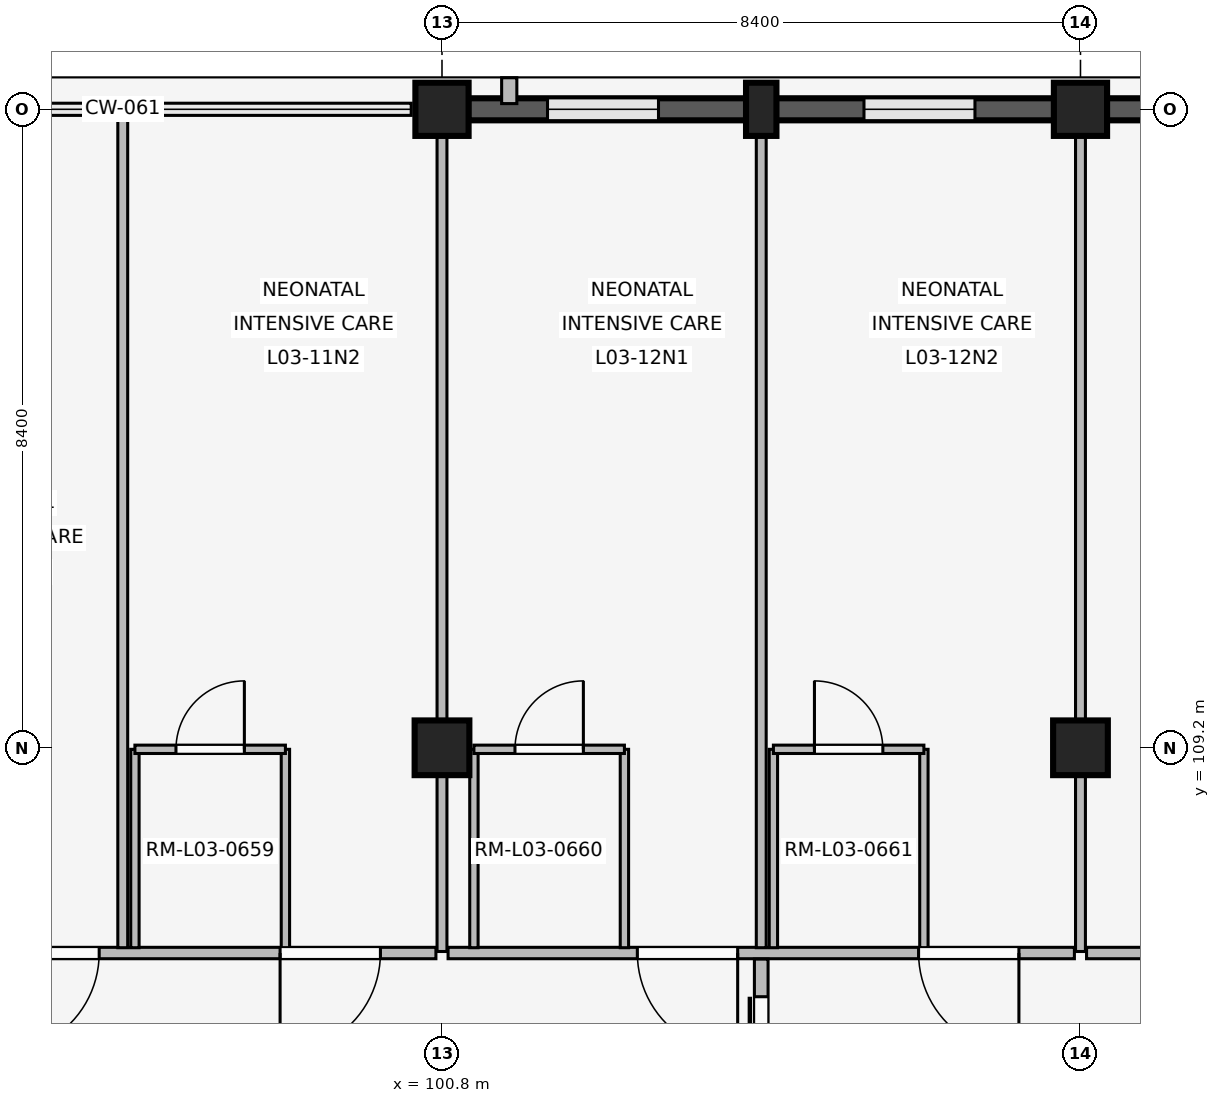
"""IFC4 building model, lengths in metres.
Left out: names, types, materials, properties, quantities, classifications, styles, units other than length and angle.
Written with IfcOpenShell. Run it as: python <this file> out.ifc"""

import sys

from ifc_helpers import new_model, si_unit, direction, frame, frame_2d, origin, origin_2d, place, context, subcontext, project, spatial, rectangle, extrude, element, fill, save


model = new_model("IFC4")
c1 = context("Model", 3, precision=1e-05, world=origin(), true_north=direction((0.0, 1.0)))
c2 = subcontext(c1, "Body", "Model", "MODEL_VIEW")
j1 = project(units=[si_unit("LENGTHUNIT", "METRE"), si_unit("PLANEANGLEUNIT", "RADIAN")], contexts=[c1])
p1 = place(None, origin())
s1 = spatial("IfcSite", under=j1, at=p1, CompositionType="ELEMENT")
p2 = place(p1, origin())
s2 = spatial("IfcBuilding", under=s1, at=p2, CompositionType="ELEMENT")
p3 = place(p2, frame((0.0, 0.0, 12.9)))
s3 = spatial("IfcBuildingStorey", under=s2, at=p3, CompositionType="ELEMENT", Elevation=12.9)
p4 = place(p3, frame((100.8, 109.2, 0.0), z_axis=(0.0, 0.0, 1.0), x_axis=(1.0, 0.0, 0.0)))
e1 = element("IfcColumn", 1, at=p4, inside=s3, PredefinedType="COLUMN", context=c2, shape_type="SweptSolid", body=[
    extrude(rectangle(XDim=0.72, YDim=0.72, at=origin_2d()), origin(), (0.0, 0.0, 1.0), 3.3),
])
p5 = place(p3, frame((100.8, 117.6, 0.0), z_axis=(0.0, 0.0, 1.0), x_axis=(1.0, 0.0, 0.0)))
e2 = element("IfcColumn", 2, at=p5, inside=s3, PredefinedType="COLUMN", context=c2, shape_type="SweptSolid", body=[
    extrude(rectangle(XDim=0.7, YDim=0.7, at=origin_2d()), origin(), (0.0, 0.0, 1.0), 3.3),
])
p6 = place(p3, frame((109.2, 109.2, 0.0), z_axis=(0.0, 0.0, 1.0), x_axis=(1.0, 0.0, 0.0)))
e3 = element("IfcColumn", 3, at=p6, inside=s3, PredefinedType="COLUMN", context=c2, shape_type="SweptSolid", body=[
    extrude(rectangle(XDim=0.72, YDim=0.72, at=origin_2d()), origin(), (0.0, 0.0, 1.0), 3.3),
])
p7 = place(p3, frame((109.2, 117.6, 0.0), z_axis=(0.0, 0.0, 1.0), x_axis=(1.0, 0.0, 0.0)))
e4 = element("IfcColumn", 4, at=p7, inside=s3, PredefinedType="COLUMN", context=c2, shape_type="SweptSolid", body=[
    extrude(rectangle(XDim=0.7, YDim=0.7, at=origin_2d()), origin(), (0.0, 0.0, 1.0), 3.3),
])
p8 = place(p3, frame((105.0, 117.6, 0.0), z_axis=(0.0, 0.0, 1.0), x_axis=(1.0, 0.0, 0.0)))
e5 = element("IfcColumn", 5, at=p8, inside=s3, PredefinedType="PILASTER", context=c2, shape_type="SweptSolid", body=[
    extrude(rectangle(XDim=0.4, YDim=0.7, at=origin_2d()), origin(), (0.0, 0.0, 1.0), 3.3),
])
p9 = place(p3, frame((101.145, 117.6, 0.0), z_axis=(0.0, 0.0, 1.0), x_axis=(1.0, 0.0, 0.0)))
e6 = element("IfcWall", 6, at=p9, inside=s3, PredefinedType="SOLIDWALL", context=c2, shape_type="SweptSolid", body=[
    extrude(rectangle(XDim=7.71, YDim=0.29, at=frame_2d((3.855, 0.0))), origin(), (0.0, 0.0, 1.0), 2.44),
])
p10 = place(p9, frame((1.043, 0.0, 0.85)))
e7 = element("IfcOpeningElement", 7, at=p10, cuts=e6, PredefinedType="OPENING", context=c2, shape_type="SweptSolid", body=[
    extrude(rectangle(XDim=1.46, YDim=0.85, at=frame_2d((0.73, 0.425))), frame((0.0, 0.155, 0.0), z_axis=(0.0, -1.0, 0.0), x_axis=(1.0, 0.0, 0.0)), (0.0, 0.0, 1.0), 0.31),
])
p11 = place(p9, frame((5.207, 0.0, 0.85)))
e8 = element("IfcOpeningElement", 8, at=p11, cuts=e6, PredefinedType="OPENING", context=c2, shape_type="SweptSolid", body=[
    extrude(rectangle(XDim=1.46, YDim=0.85, at=frame_2d((0.73, 0.425))), frame((0.0, 0.155, 0.0), z_axis=(0.0, -1.0, 0.0), x_axis=(1.0, 0.0, 0.0)), (0.0, 0.0, 1.0), 0.31),
])
p12 = place(p3, frame((101.685, 117.675, 0.0), z_axis=(0.0, 0.0, 1.0), x_axis=(0.0, 1.0, 0.0)))
e9 = element("IfcWall", 9, at=p12, inside=s3, PredefinedType="ELEMENTEDWALL", context=c2, shape_type="SweptSolid", body=[
    extrude(rectangle(XDim=0.34, YDim=0.2, at=frame_2d((0.17, 0.0))), origin(), (0.0, 0.0, 1.0), 2.42),
])
p13 = place(p3, frame((109.545, 117.6, 0.0), z_axis=(0.0, 0.0, 1.0), x_axis=(1.0, 0.0, 0.0)))
e10 = element("IfcWall", 10, at=p13, inside=s3, PredefinedType="SOLIDWALL", context=c2, shape_type="SweptSolid", body=[
    extrude(rectangle(XDim=7.71, YDim=0.29, at=frame_2d((3.855, 0.0))), origin(), (0.0, 0.0, 1.0), 2.44),
])
p14 = place(p13, frame((0.963, 0.0, 0.85)))
e11 = element("IfcOpeningElement", 11, at=p14, cuts=e10, PredefinedType="OPENING", context=c2, shape_type="SweptSolid", body=[
    extrude(rectangle(XDim=1.62, YDim=0.95, at=frame_2d((0.81, 0.475))), frame((0.0, 0.155, 0.0), z_axis=(0.0, -1.0, 0.0), x_axis=(1.0, 0.0, 0.0)), (0.0, 0.0, 1.0), 0.31),
])
p15 = place(p13, frame((5.127, 0.0, 0.85)))
e12 = element("IfcOpeningElement", 12, at=p15, cuts=e10, PredefinedType="OPENING", context=c2, shape_type="SweptSolid", body=[
    extrude(rectangle(XDim=1.62, YDim=0.95, at=frame_2d((0.81, 0.475))), frame((0.0, 0.155, 0.0), z_axis=(0.0, -1.0, 0.0), x_axis=(1.0, 0.0, 0.0)), (0.0, 0.0, 1.0), 0.31),
])
p16 = place(p3, frame((100.72, 106.5, 0.0), z_axis=(0.0, 0.0, 1.0), x_axis=(-1.0, 0.0, 0.0)))
e13 = element("IfcWall", 13, at=p16, inside=s3, PredefinedType="PARTITIONING", context=c2, shape_type="SweptSolid", body=[
    extrude(rectangle(XDim=7.96, YDim=0.15, at=frame_2d((3.98, 0.0))), origin(), (0.0, 0.0, 1.0), 2.42),
])
p17 = place(p16, frame((0.73, 0.0, 0.0)))
e14 = element("IfcOpeningElement", 14, at=p17, cuts=e13, PredefinedType="OPENING", context=c2, shape_type="SweptSolid", body=[
    extrude(rectangle(XDim=1.32, YDim=2.25, at=frame_2d((0.66, 1.125))), frame((0.0, 0.085, 0.0), z_axis=(0.0, -1.0, 0.0), x_axis=(1.0, 0.0, 0.0)), (0.0, 0.0, 1.0), 0.17),
])
p18 = place(p16, frame((4.43, 0.0, 0.0)))
e15 = element("IfcOpeningElement", 15, at=p18, cuts=e13, PredefinedType="OPENING", context=c2, shape_type="SweptSolid", body=[
    extrude(rectangle(XDim=1.32, YDim=2.25, at=frame_2d((0.66, 1.125))), frame((0.0, 0.085, 0.0), z_axis=(0.0, -1.0, 0.0), x_axis=(1.0, 0.0, 0.0)), (0.0, 0.0, 1.0), 0.17),
])
p19 = place(p3, frame((96.6, 106.57, 0.0), z_axis=(0.0, 0.0, 1.0), x_axis=(0.0, 1.0, 0.0)))
e16 = element("IfcWall", 16, at=p19, inside=s3, PredefinedType="PARTITIONING", context=c2, shape_type="SweptSolid", body=[
    extrude(rectangle(XDim=10.93, YDim=0.13, at=frame_2d((5.465, 0.0))), origin(), (0.0, 0.0, 1.0), 2.42),
])
for number, where, z_axis, x_axis in (
    (17, (96.76, 106.57, 0.0), (0.0, 0.0, 1.0), (0.0, 1.0, 0.0)),
    (18, (98.74, 106.57, 0.0), (0.0, 0.0, 1.0), (0.0, 1.0, 0.0)),
):
    element("IfcWall", number, at=place(p3, frame(where, z_axis=z_axis, x_axis=x_axis)), inside=s3, PredefinedType="PARTITIONING", context=c2, shape_type="SweptSolid", body=[
        extrude(rectangle(XDim=2.61, YDim=0.11, at=frame_2d((1.305, 0.0))), origin(), (0.0, 0.0, 1.0), 2.42),
    ])
p20 = place(p3, frame((96.76, 109.18, 0.0), z_axis=(0.0, 0.0, 1.0), x_axis=(1.0, 0.0, 0.0)))
e19 = element("IfcWall", 19, at=p20, inside=s3, PredefinedType="PARTITIONING", context=c2, shape_type="SweptSolid", body=[
    extrude(rectangle(XDim=1.98, YDim=0.11, at=frame_2d((0.99, 0.0))), origin(), (0.0, 0.0, 1.0), 2.42),
])
p21 = place(p20, frame((0.54, 0.0, 0.0)))
e20 = element("IfcOpeningElement", 20, at=p21, cuts=e19, PredefinedType="OPENING", context=c2, shape_type="SweptSolid", body=[
    extrude(rectangle(XDim=0.9, YDim=2.1, at=frame_2d((0.45, 1.05))), frame((0.0, 0.065, 0.0), z_axis=(0.0, -1.0, 0.0), x_axis=(1.0, 0.0, 0.0)), (0.0, 0.0, 1.0), 0.13),
])
p22 = place(p3, frame((100.8, 106.52, 0.0), z_axis=(0.0, 0.0, 1.0), x_axis=(0.0, 1.0, 0.0)))
e21 = element("IfcWall", 21, at=p22, inside=s3, PredefinedType="PARTITIONING", context=c2, shape_type="SweptSolid", body=[
    extrude(rectangle(XDim=10.94, YDim=0.13, at=frame_2d((5.47, 0.0))), origin(), (0.0, 0.0, 1.0), 2.42),
])
p23 = place(p3, frame((109.12, 106.5, 0.0), z_axis=(0.0, 0.0, 1.0), x_axis=(-1.0, 0.0, 0.0)))
e22 = element("IfcWall", 22, at=p23, inside=s3, PredefinedType="PARTITIONING", context=c2, shape_type="SweptSolid", body=[
    extrude(rectangle(XDim=8.24, YDim=0.15, at=frame_2d((4.12, 0.0))), origin(), (0.0, 0.0, 1.0), 2.42),
])
p24 = place(p23, frame((0.73, 0.0, 0.0)))
e23 = element("IfcOpeningElement", 23, at=p24, cuts=e22, PredefinedType="OPENING", context=c2, shape_type="SweptSolid", body=[
    extrude(rectangle(XDim=1.32, YDim=2.25, at=frame_2d((0.66, 1.125))), frame((0.0, 0.085, 0.0), z_axis=(0.0, -1.0, 0.0), x_axis=(1.0, 0.0, 0.0)), (0.0, 0.0, 1.0), 0.17),
])
p25 = place(p23, frame((4.43, 0.0, 0.0)))
e24 = element("IfcOpeningElement", 24, at=p25, cuts=e22, PredefinedType="OPENING", context=c2, shape_type="SweptSolid", body=[
    extrude(rectangle(XDim=1.32, YDim=2.25, at=frame_2d((0.66, 1.125))), frame((0.0, 0.085, 0.0), z_axis=(0.0, -1.0, 0.0), x_axis=(1.0, 0.0, 0.0)), (0.0, 0.0, 1.0), 0.17),
])
p26 = place(p3, frame((105.0, 106.57, 0.0), z_axis=(0.0, 0.0, 1.0), x_axis=(0.0, 1.0, 0.0)))
e25 = element("IfcWall", 25, at=p26, inside=s3, PredefinedType="PARTITIONING", context=c2, shape_type="SweptSolid", body=[
    extrude(rectangle(XDim=10.93, YDim=0.13, at=frame_2d((5.465, 0.0))), origin(), (0.0, 0.0, 1.0), 2.42),
])
for number, where, z_axis, x_axis in (
    (26, (101.22, 106.57, 0.0), (0.0, 0.0, 1.0), (0.0, 1.0, 0.0)),
    (27, (103.2, 106.57, 0.0), (0.0, 0.0, 1.0), (0.0, 1.0, 0.0)),
):
    element("IfcWall", number, at=place(p3, frame(where, z_axis=z_axis, x_axis=x_axis)), inside=s3, PredefinedType="PARTITIONING", context=c2, shape_type="SweptSolid", body=[
        extrude(rectangle(XDim=2.61, YDim=0.11, at=frame_2d((1.305, 0.0))), origin(), (0.0, 0.0, 1.0), 2.42),
    ])
p27 = place(p3, frame((101.22, 109.18, 0.0), z_axis=(0.0, 0.0, 1.0), x_axis=(1.0, 0.0, 0.0)))
e28 = element("IfcWall", 28, at=p27, inside=s3, PredefinedType="PARTITIONING", context=c2, shape_type="SweptSolid", body=[
    extrude(rectangle(XDim=1.98, YDim=0.11, at=frame_2d((0.99, 0.0))), origin(), (0.0, 0.0, 1.0), 2.42),
])
p28 = place(p27, frame((0.54, 0.0, 0.0)))
e29 = element("IfcOpeningElement", 29, at=p28, cuts=e28, PredefinedType="OPENING", context=c2, shape_type="SweptSolid", body=[
    extrude(rectangle(XDim=0.9, YDim=2.1, at=frame_2d((0.45, 1.05))), frame((0.0, 0.065, 0.0), z_axis=(0.0, -1.0, 0.0), x_axis=(1.0, 0.0, 0.0)), (0.0, 0.0, 1.0), 0.13),
])
for number, where, z_axis, x_axis in (
    (30, (105.16, 106.57, 0.0), (0.0, 0.0, 1.0), (0.0, 1.0, 0.0)),
    (31, (107.14, 106.57, 0.0), (0.0, 0.0, 1.0), (0.0, 1.0, 0.0)),
):
    element("IfcWall", number, at=place(p3, frame(where, z_axis=z_axis, x_axis=x_axis)), inside=s3, PredefinedType="PARTITIONING", context=c2, shape_type="SweptSolid", body=[
        extrude(rectangle(XDim=2.61, YDim=0.11, at=frame_2d((1.305, 0.0))), origin(), (0.0, 0.0, 1.0), 2.42),
    ])
p29 = place(p3, frame((105.16, 109.18, 0.0), z_axis=(0.0, 0.0, 1.0), x_axis=(1.0, 0.0, 0.0)))
e32 = element("IfcWall", 32, at=p29, inside=s3, PredefinedType="PARTITIONING", context=c2, shape_type="SweptSolid", body=[
    extrude(rectangle(XDim=1.98, YDim=0.11, at=frame_2d((0.99, 0.0))), origin(), (0.0, 0.0, 1.0), 2.42),
])
p30 = place(p29, frame((0.54, 0.0, 0.0)))
e33 = element("IfcOpeningElement", 33, at=p30, cuts=e32, PredefinedType="OPENING", context=c2, shape_type="SweptSolid", body=[
    extrude(rectangle(XDim=0.9, YDim=2.1, at=frame_2d((0.45, 1.05))), frame((0.0, 0.065, 0.0), z_axis=(0.0, -1.0, 0.0), x_axis=(1.0, 0.0, 0.0)), (0.0, 0.0, 1.0), 0.13),
])
p31 = place(p3, frame((105.0, 103.58, 0.0), z_axis=(0.0, 0.0, 1.0), x_axis=(0.0, 1.0, 0.0)))
e34 = element("IfcWall", 34, at=p31, inside=s3, PredefinedType="PARTITIONING", context=c2, shape_type="SweptSolid", body=[
    extrude(rectangle(XDim=2.84, YDim=0.18, at=frame_2d((1.42, 0.0))), origin(), (0.0, 0.0, 1.0), 2.42),
])
p32 = place(p31, frame((0.495, 0.0, 0.0)))
e35 = element("IfcOpeningElement", 35, at=p32, cuts=e34, PredefinedType="OPENING", context=c2, shape_type="SweptSolid", body=[
    extrude(rectangle(XDim=1.85, YDim=2.3, at=frame_2d((0.925, 1.15))), frame((0.0, 0.1, 0.0), z_axis=(0.0, -1.0, 0.0), x_axis=(1.0, 0.0, 0.0)), (0.0, 0.0, 1.0), 0.2),
])
p33 = place(p3, frame((109.2, 106.52, 0.0), z_axis=(0.0, 0.0, 1.0), x_axis=(0.0, 1.0, 0.0)))
e36 = element("IfcWall", 36, at=p33, inside=s3, PredefinedType="PARTITIONING", context=c2, shape_type="SweptSolid", body=[
    extrude(rectangle(XDim=10.94, YDim=0.13, at=frame_2d((5.47, 0.0))), origin(), (0.0, 0.0, 1.0), 2.42),
])
p34 = place(p3, frame((117.52, 106.5, 0.0), z_axis=(0.0, 0.0, 1.0), x_axis=(-1.0, 0.0, 0.0)))
e37 = element("IfcWall", 37, at=p34, inside=s3, PredefinedType="PARTITIONING", context=c2, shape_type="SweptSolid", body=[
    extrude(rectangle(XDim=8.24, YDim=0.15, at=frame_2d((4.12, 0.0))), origin(), (0.0, 0.0, 1.0), 2.42),
])
p35 = place(p34, frame((3.495, 0.0, 0.0)))
e38 = element("IfcOpeningElement", 38, at=p35, cuts=e37, PredefinedType="OPENING", context=c2, shape_type="SweptSolid", body=[
    extrude(rectangle(XDim=1.25, YDim=2.2, at=frame_2d((0.625, 1.1))), frame((0.0, 0.085, 0.0), z_axis=(0.0, -1.0, 0.0), x_axis=(1.0, 0.0, 0.0)), (0.0, 0.0, 1.0), 0.17),
])
p36 = place(p10, origin())
e39 = element("IfcWindow", 39, at=p36, inside=s3, PartitioningType="SINGLE_PANEL", PredefinedType="WINDOW", context=c2, shape_type="SweptSolid", body=[
    extrude(rectangle(XDim=1.46, YDim=0.85, at=frame_2d((0.73, 0.425))), frame((0.0, 0.03, 0.0), z_axis=(0.0, -1.0, 0.0), x_axis=(1.0, 0.0, 0.0)), (0.0, 0.0, 1.0), 0.06),
])
fill(e7, e39)
p37 = place(p11, origin())
e40 = element("IfcWindow", 40, at=p37, inside=s3, PartitioningType="SINGLE_PANEL", PredefinedType="WINDOW", context=c2, shape_type="SweptSolid", body=[
    extrude(rectangle(XDim=1.46, YDim=0.85, at=frame_2d((0.73, 0.425))), frame((0.0, 0.03, 0.0), z_axis=(0.0, -1.0, 0.0), x_axis=(1.0, 0.0, 0.0)), (0.0, 0.0, 1.0), 0.06),
])
fill(e8, e40)
p38 = place(p17, origin())
e41 = element("IfcDoor", 41, at=p38, inside=s3, OperationType="SINGLE_SWING_RIGHT", PredefinedType="DOOR", context=c2, shape_type="SweptSolid", body=[
    extrude(rectangle(XDim=1.32, YDim=2.25, at=frame_2d((0.66, 1.125))), frame((0.0, 0.025, 0.0), z_axis=(0.0, -1.0, 0.0), x_axis=(1.0, 0.0, 0.0)), (0.0, 0.0, 1.0), 0.05),
])
fill(e14, e41)
p39 = place(p18, origin())
e42 = element("IfcDoor", 42, at=p39, inside=s3, OperationType="SINGLE_SWING_RIGHT", PredefinedType="DOOR", context=c2, shape_type="SweptSolid", body=[
    extrude(rectangle(XDim=1.32, YDim=2.25, at=frame_2d((0.66, 1.125))), frame((0.0, 0.025, 0.0), z_axis=(0.0, -1.0, 0.0), x_axis=(1.0, 0.0, 0.0)), (0.0, 0.0, 1.0), 0.05),
])
fill(e15, e42)
p40 = place(p21, origin())
e43 = element("IfcDoor", 43, at=p40, inside=s3, OperationType="SINGLE_SWING_RIGHT", PredefinedType="DOOR", context=c2, shape_type="SweptSolid", body=[
    extrude(rectangle(XDim=0.9, YDim=2.1, at=frame_2d((0.45, 1.05))), frame((0.0, 0.025, 0.0), z_axis=(0.0, -1.0, 0.0), x_axis=(1.0, 0.0, 0.0)), (0.0, 0.0, 1.0), 0.05),
])
fill(e20, e43)
p41 = place(p24, origin())
e44 = element("IfcDoor", 44, at=p41, inside=s3, OperationType="SINGLE_SWING_LEFT", PredefinedType="DOOR", context=c2, shape_type="SweptSolid", body=[
    extrude(rectangle(XDim=1.32, YDim=2.25, at=frame_2d((0.66, 1.125))), frame((0.0, 0.025, 0.0), z_axis=(0.0, -1.0, 0.0), x_axis=(1.0, 0.0, 0.0)), (0.0, 0.0, 1.0), 0.05),
])
fill(e23, e44)
p42 = place(p25, origin())
e45 = element("IfcDoor", 45, at=p42, inside=s3, OperationType="SINGLE_SWING_LEFT", PredefinedType="DOOR", context=c2, shape_type="SweptSolid", body=[
    extrude(rectangle(XDim=1.32, YDim=2.25, at=frame_2d((0.66, 1.125))), frame((0.0, 0.025, 0.0), z_axis=(0.0, -1.0, 0.0), x_axis=(1.0, 0.0, 0.0)), (0.0, 0.0, 1.0), 0.05),
])
fill(e24, e45)
p43 = place(p28, origin())
e46 = element("IfcDoor", 46, at=p43, inside=s3, OperationType="SINGLE_SWING_RIGHT", PredefinedType="DOOR", context=c2, shape_type="SweptSolid", body=[
    extrude(rectangle(XDim=0.9, YDim=2.1, at=frame_2d((0.45, 1.05))), frame((0.0, 0.025, 0.0), z_axis=(0.0, -1.0, 0.0), x_axis=(1.0, 0.0, 0.0)), (0.0, 0.0, 1.0), 0.05),
])
fill(e29, e46)
p44 = place(p30, origin())
e47 = element("IfcDoor", 47, at=p44, inside=s3, OperationType="SINGLE_SWING_LEFT", PredefinedType="DOOR", context=c2, shape_type="SweptSolid", body=[
    extrude(rectangle(XDim=0.9, YDim=2.1, at=frame_2d((0.45, 1.05))), frame((0.0, 0.025, 0.0), z_axis=(0.0, -1.0, 0.0), x_axis=(1.0, 0.0, 0.0)), (0.0, 0.0, 1.0), 0.05),
])
fill(e33, e47)
p45 = place(p32, origin())
e48 = element("IfcDoor", 48, at=p45, inside=s3, OperationType="SLIDING_TO_LEFT", PredefinedType="DOOR", context=c2, shape_type="SweptSolid", body=[
    extrude(rectangle(XDim=1.85, YDim=2.3, at=frame_2d((0.925, 1.15))), frame((0.0, 0.025, 0.0), z_axis=(0.0, -1.0, 0.0), x_axis=(1.0, 0.0, 0.0)), (0.0, 0.0, 1.0), 0.05),
])
fill(e35, e48)
save(model, sys.argv[1])
